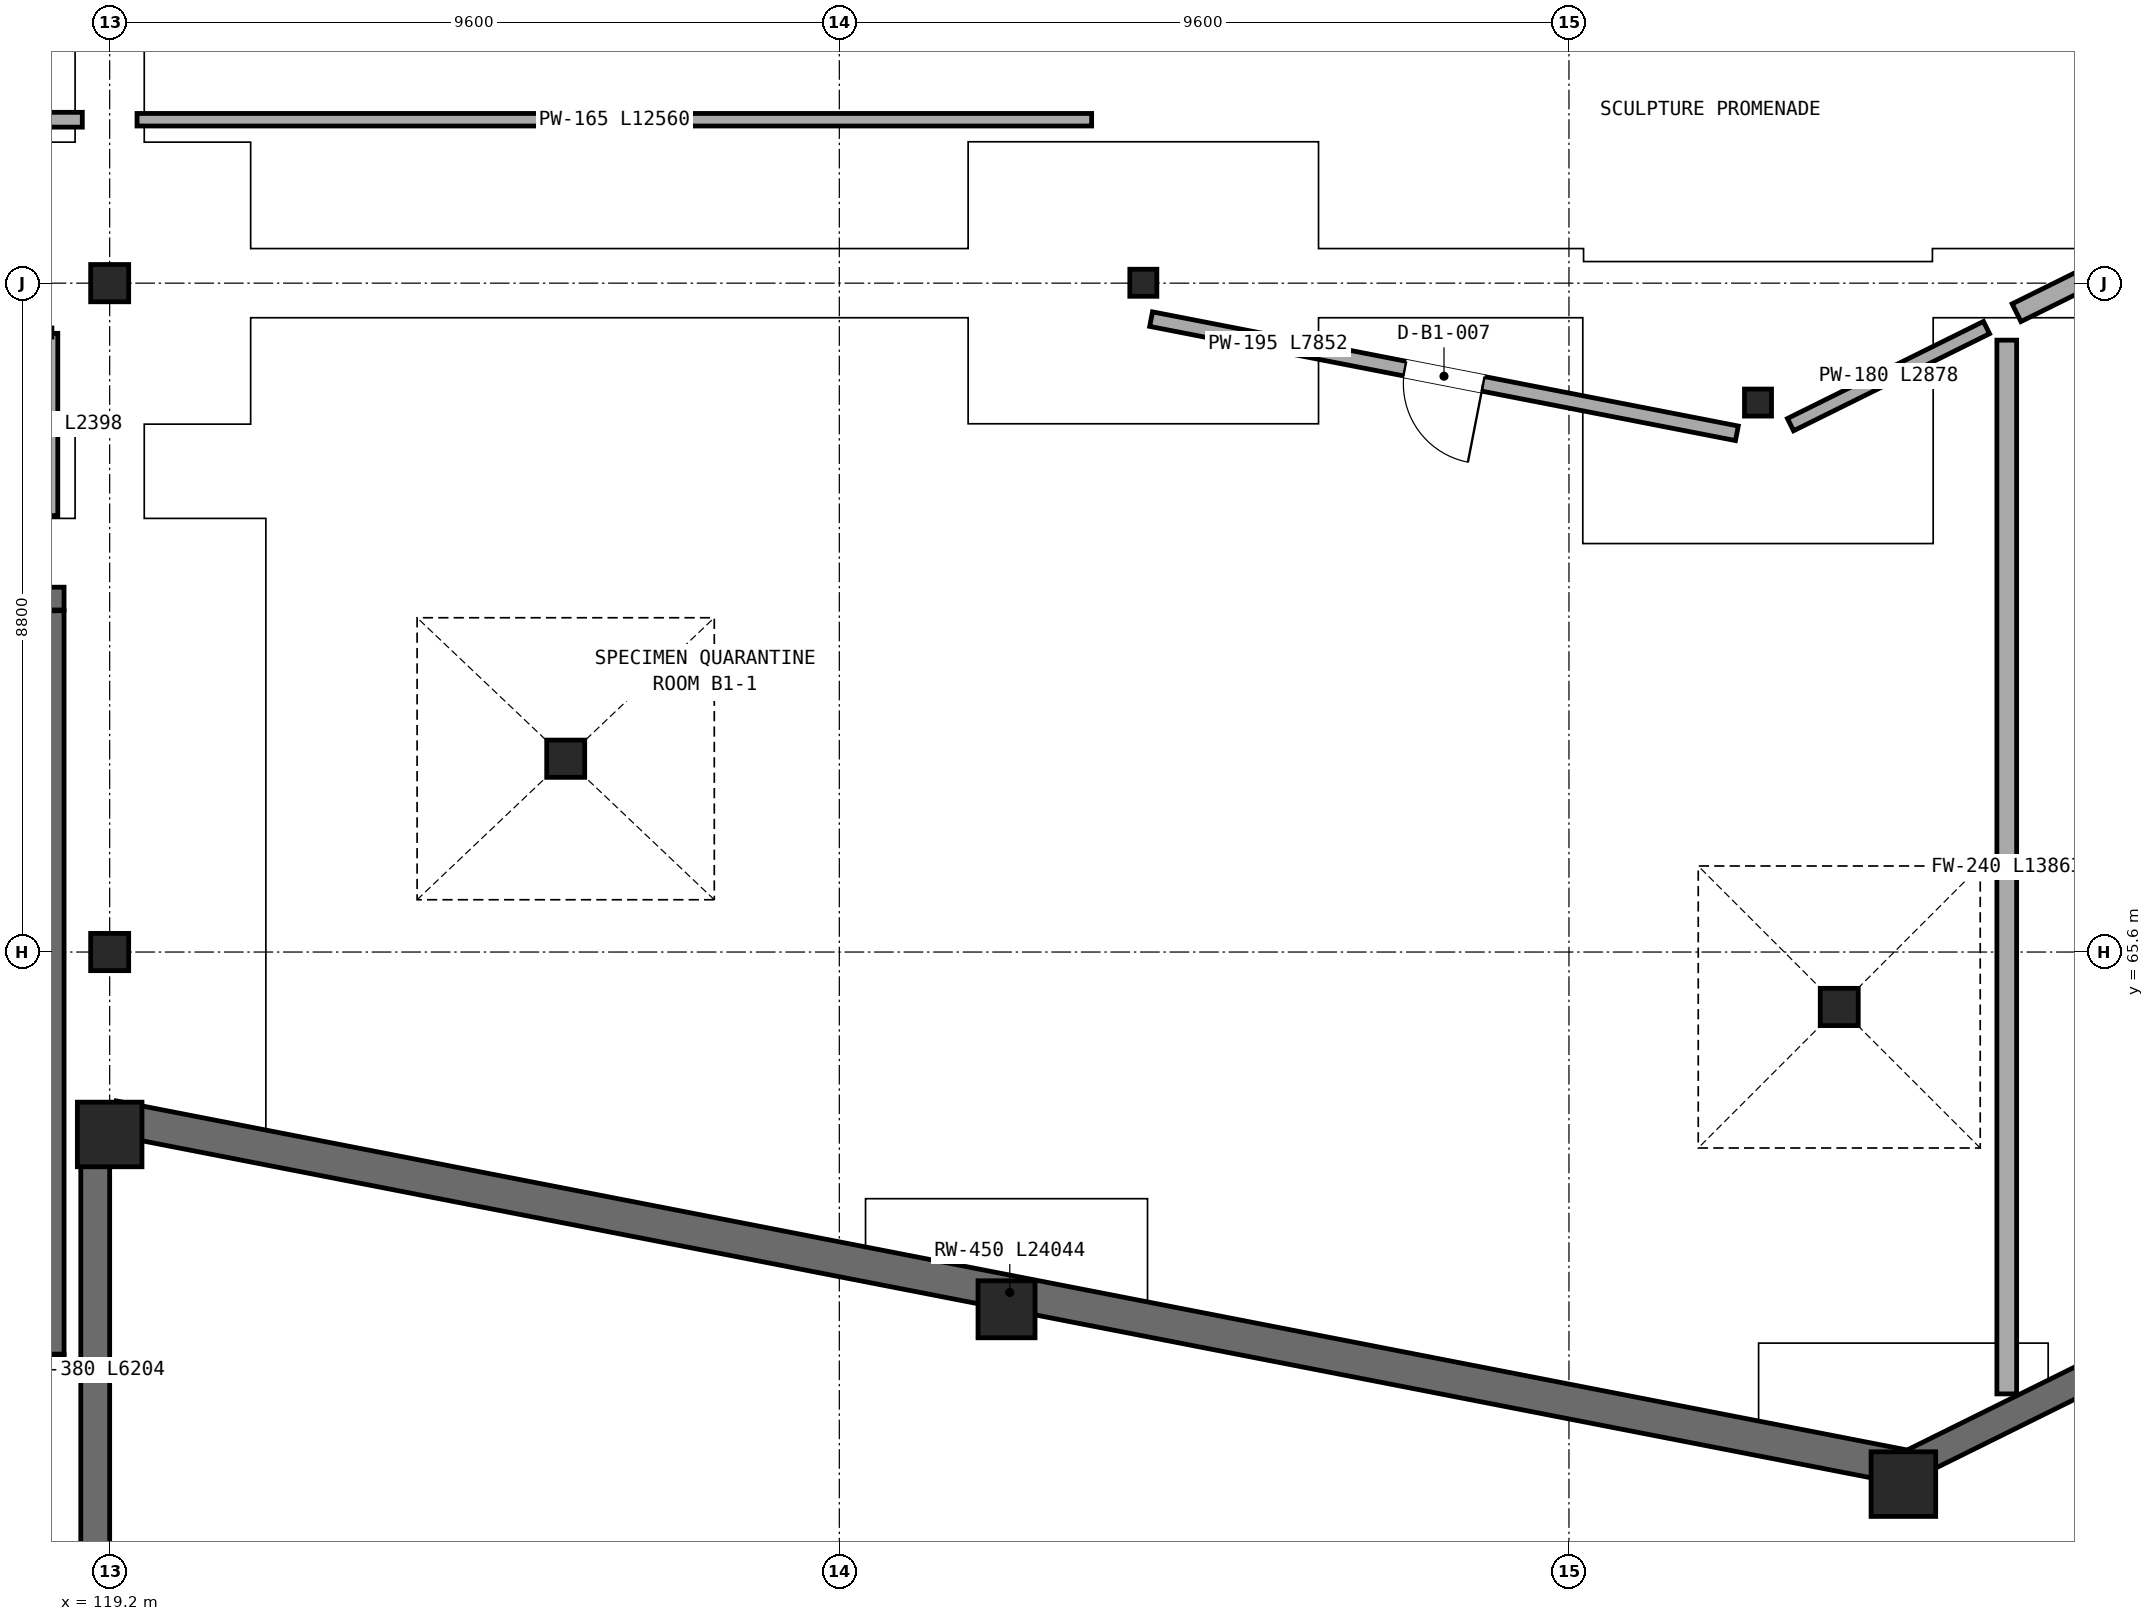
"""IFC4 building model, lengths in metres.
Left out: names, types, materials, properties, quantities, classifications, styles, units other than length and angle.
Written with IfcOpenShell. Run it as: python <this file> out.ifc"""

import sys

from ifc_helpers import new_model, si_unit, direction, frame, frame_2d, origin, origin_2d, place, context, subcontext, project, spatial, rectangle, hollow_circle, i_section, extrude, element, fill, save


model = new_model("IFC4")
c1 = context("Model", 3, precision=1e-05, world=origin(), true_north=direction((0.0, 1.0)))
c2 = subcontext(c1, "Body", "Model", "MODEL_VIEW")
j1 = project(units=[si_unit("LENGTHUNIT", "METRE"), si_unit("PLANEANGLEUNIT", "RADIAN")], contexts=[c1])
p1 = place(None, origin())
s1 = spatial("IfcSite", under=j1, at=p1, CompositionType="ELEMENT")
p2 = place(p1, origin())
s2 = spatial("IfcBuilding", under=s1, at=p2, CompositionType="ELEMENT")
p3 = place(p2, frame((0.0, 0.0, -5.4)))
s3 = spatial("IfcBuildingStorey", under=s2, at=p3, CompositionType="ELEMENT", Elevation=-5.4)
for number, where, z_axis, x_axis in (
    (1, (119.2, 65.6, 0.0), (0.0, 0.0, 1.0), (1.0, 0.0, 0.0)),
    (2, (119.2, 74.4, 0.0), (0.0, 0.0, 1.0), (1.0, 0.0, 0.0)),
):
    element("IfcColumn", number, at=place(p3, frame(where, z_axis=z_axis, x_axis=x_axis)), inside=s3, PredefinedType="COLUMN", context=c2, shape_type="SweptSolid", body=[
        extrude(i_section(OverallWidth=0.5, OverallDepth=0.49, WebThickness=0.028, FlangeThickness=0.04, at=origin_2d()), origin(), (0.0, 0.0, 1.0), 5.4),
    ])
p4 = place(p3, frame((119.2, 63.2, 0.0), z_axis=(0.0, 0.0, 1.0), x_axis=(1.0, 0.0, 0.0)))
e3 = element("IfcColumn", 3, at=p4, inside=s3, PredefinedType="COLUMN", context=c2, shape_type="SweptSolid", body=[
    extrude(rectangle(XDim=0.85, YDim=0.85, at=origin_2d()), origin(), (0.0, 0.0, 1.0), 5.4),
])
p5 = place(p3, frame((131.0, 60.9, 0.0), z_axis=(0.0, 0.0, 1.0), x_axis=(1.0, 0.0, 0.0)))
e4 = element("IfcColumn", 4, at=p5, inside=s3, PredefinedType="COLUMN", context=c2, shape_type="SweptSolid", body=[
    extrude(rectangle(XDim=0.75, YDim=0.75, at=origin_2d()), origin(), (0.0, 0.0, 1.0), 5.4),
])
p6 = place(p3, frame((125.2, 68.143, 0.0), z_axis=(0.0, 0.0, 1.0), x_axis=(1.0, 0.0, 0.0)))
e5 = element("IfcColumn", 5, at=p6, inside=s3, PredefinedType="COLUMN", context=c2, shape_type="SweptSolid", body=[
    extrude(i_section(OverallWidth=0.5, OverallDepth=0.49, WebThickness=0.028, FlangeThickness=0.04, at=origin_2d()), origin(), (0.0, 0.0, 1.0), 5.4),
])
p7 = place(p3, frame((132.8, 74.405, 0.0), z_axis=(0.0, 0.0, 1.0), x_axis=(1.0, 0.0, 0.0)))
e6 = element("IfcColumn", 6, at=p7, inside=s3, PredefinedType="COLUMN", context=c2, shape_type="SweptSolid", body=[
    extrude(hollow_circle(Radius=0.178, WallThickness=0.013, at=origin_2d()), origin(), (0.0, 0.0, 1.0), 5.4),
])
p8 = place(p3, frame((142.8, 58.6, 0.0), z_axis=(0.0, 0.0, 1.0), x_axis=(1.0, 0.0, 0.0)))
e7 = element("IfcColumn", 7, at=p8, inside=s3, PredefinedType="COLUMN", context=c2, shape_type="SweptSolid", body=[
    extrude(rectangle(XDim=0.85, YDim=0.85, at=origin_2d()), origin(), (0.0, 0.0, 1.0), 5.4),
])
p9 = place(p3, frame((141.956, 64.877, 0.0), z_axis=(0.0, 0.0, 1.0), x_axis=(1.0, 0.0, 0.0)))
e8 = element("IfcColumn", 8, at=p9, inside=s3, PredefinedType="COLUMN", context=c2, shape_type="SweptSolid", body=[
    extrude(i_section(OverallWidth=0.5, OverallDepth=0.49, WebThickness=0.028, FlangeThickness=0.04, at=origin_2d()), origin(), (0.0, 0.0, 1.0), 5.4),
])
p10 = place(p3, frame((140.887, 72.829, 0.0), z_axis=(0.0, 0.0, 1.0), x_axis=(1.0, 0.0, 0.0)))
e9 = element("IfcColumn", 9, at=p10, inside=s3, PredefinedType="COLUMN", context=c2, shape_type="SweptSolid", body=[
    extrude(hollow_circle(Radius=0.178, WallThickness=0.013, at=origin_2d()), origin(), (0.0, 0.0, 1.0), 5.4),
])
p11 = place(p3, frame((119.01, 56.996, 0.0), z_axis=(0.0, 0.0, 1.0), x_axis=(0.0, 1.0, 0.0)))
e10 = element("IfcWall", 10, at=p11, inside=s3, PredefinedType="USERDEFINED", context=c2, shape_type="SweptSolid", body=[
    extrude(rectangle(XDim=6.204, YDim=0.38, at=frame_2d((3.102, 0.0))), origin(), (0.0, 0.0, 1.0), 5.06),
])
p12 = place(p3, frame((119.243, 63.421, 0.0), z_axis=(0.0, 0.0, 1.0), x_axis=(0.981528092823, -0.191318067624, 0.0)))
e11 = element("IfcWall", 11, at=p12, inside=s3, PredefinedType="USERDEFINED", context=c2, shape_type="SweptSolid", body=[
    extrude(rectangle(XDim=24.044, YDim=0.45, at=frame_2d((12.022, 0.0))), origin(), (0.0, 0.0, 1.0), 5.06),
])
p13 = place(p3, frame((142.891, 58.857, 0.0), z_axis=(0.0, 0.0, 1.0), x_axis=(0.896160082765, 0.443730893739, 0.0)))
e12 = element("IfcWall", 12, at=p13, inside=s3, PredefinedType="USERDEFINED", context=c2, shape_type="SweptSolid", body=[
    extrude(rectangle(XDim=22.791, YDim=0.38, at=frame_2d((11.396, 0.0))), origin(), (0.0, 0.0, 1.0), 5.06),
])
p14 = place(p3, frame((110.2, 60.15, 0.0), z_axis=(0.0, 0.0, 1.0), x_axis=(1.0, 0.0, 0.0)))
e13 = element("IfcWall", 13, at=p14, inside=s3, PredefinedType="SHEAR", context=c2, shape_type="SweptSolid", body=[
    extrude(rectangle(XDim=8.4, YDim=0.3, at=frame_2d((4.2, 0.0))), origin(), (0.0, 0.0, 1.0), 5.095),
])
p15 = place(p3, frame((118.6, 70.25, 0.0), z_axis=(0.0, 0.0, 1.0), x_axis=(-1.0, 0.0, 0.0)))
e14 = element("IfcWall", 14, at=p15, inside=s3, PredefinedType="SHEAR", context=c2, shape_type="SweptSolid", body=[
    extrude(rectangle(XDim=8.4, YDim=0.3, at=frame_2d((4.2, 0.0))), origin(), (0.0, 0.0, 1.0), 5.095),
])
p16 = place(p15, frame((1.025, 0.0, 0.0)))
e15 = element("IfcOpeningElement", 15, at=p16, cuts=e14, PredefinedType="OPENING", context=c2, shape_type="SweptSolid", body=[
    extrude(rectangle(XDim=1.45, YDim=2.25, at=frame_2d((0.725, 1.125))), frame((0.0, 0.16, 0.0), z_axis=(0.0, -1.0, 0.0), x_axis=(1.0, 0.0, 0.0)), (0.0, 0.0, 1.0), 0.32),
])
p17 = place(p3, frame((118.45, 60.31, 0.0), z_axis=(0.0, 0.0, 1.0), x_axis=(0.0, 1.0, 0.0)))
e16 = element("IfcWall", 16, at=p17, inside=s3, PredefinedType="SHEAR", context=c2, shape_type="SweptSolid", body=[
    extrude(rectangle(XDim=9.78, YDim=0.3, at=frame_2d((4.89, 0.0))), origin(), (0.0, 0.0, 1.0), 5.095),
])
p18 = place(p3, frame((132.902, 73.927, 0.0), z_axis=(0.0, 0.0, 1.0), x_axis=(0.98152920164, -0.191312378918, 0.0)))
e17 = element("IfcWall", 17, at=p18, inside=s3, PredefinedType="PARTITIONING", context=c2, shape_type="SweptSolid", body=[
    extrude(rectangle(XDim=7.852, YDim=0.195, at=frame_2d((3.926, 0.0))), origin(), (0.0, 0.0, 1.0), 5.03),
])
p19 = place(p18, frame((3.401, 0.0, 0.0)))
e18 = element("IfcOpeningElement", 18, at=p19, cuts=e17, PredefinedType="OPENING", context=c2, shape_type="SweptSolid", body=[
    extrude(rectangle(XDim=1.05, YDim=2.15, at=frame_2d((0.525, 1.075))), frame((0.0, 0.107, 0.0), z_axis=(0.0, -1.0, 0.0), x_axis=(1.0, 0.0, 0.0)), (0.0, 0.0, 1.0), 0.215),
])
p20 = place(p3, frame((141.315, 72.538, 0.0), z_axis=(0.0, 0.0, 1.0), x_axis=(0.89618477276, 0.443681026272, 0.0)))
e19 = element("IfcWall", 19, at=p20, inside=s3, PredefinedType="PARTITIONING", context=c2, shape_type="SweptSolid", body=[
    extrude(rectangle(XDim=2.878, YDim=0.18, at=frame_2d((1.439, 0.0))), origin(), (0.0, 0.0, 1.0), 5.03),
])
p21 = place(p3, frame((119.56, 76.55, 0.0), z_axis=(0.0, 0.0, 1.0), x_axis=(1.0, 0.0, 0.0)))
e20 = element("IfcWall", 20, at=p21, inside=s3, PredefinedType="PARTITIONING", context=c2, shape_type="SweptSolid", body=[
    extrude(rectangle(XDim=12.56, YDim=0.165, at=frame_2d((6.28, 0.0))), origin(), (0.0, 0.0, 1.0), 4.36),
])
p22 = place(p3, frame((144.289, 74.011, 0.0), z_axis=(0.0, 0.0, 1.0), x_axis=(0.896175386907, 0.443699984113, 0.0)))
e21 = element("IfcWall", 21, at=p22, inside=s3, PredefinedType="SOLIDWALL", context=c2, shape_type="SweptSolid", body=[
    extrude(rectangle(XDim=8.569, YDim=0.26, at=frame_2d((4.284, 0.0))), origin(), (0.0, 0.0, 1.0), 5.03),
])
p23 = place(p3, frame((118.45, 71.342, 0.0), z_axis=(0.0, 0.0, 1.0), x_axis=(0.0, 1.0, 0.0)))
e22 = element("IfcWall", 22, at=p23, inside=s3, PredefinedType="PARTITIONING", context=c2, shape_type="SweptSolid", body=[
    extrude(rectangle(XDim=2.398, YDim=0.135, at=frame_2d((1.199, 0.0))), origin(), (0.0, 0.0, 1.0), 5.03),
])
p24 = place(p3, frame((109.23, 76.55, 0.0), z_axis=(0.0, 0.0, 1.0), x_axis=(1.0, 0.0, 0.0)))
e23 = element("IfcWall", 23, at=p24, inside=s3, PredefinedType="PARTITIONING", context=c2, shape_type="SweptSolid", body=[
    extrude(rectangle(XDim=9.61, YDim=0.195, at=frame_2d((4.805, 0.0))), origin(), (0.0, 0.0, 1.0), 4.537),
])
p25 = place(p3, frame((144.16, 73.65, 0.0), z_axis=(0.0, 0.0, 1.0), x_axis=(0.0, -1.0, 0.0)))
e24 = element("IfcWall", 24, at=p25, inside=s3, PredefinedType="SOLIDWALL", context=c2, shape_type="SweptSolid", body=[
    extrude(rectangle(XDim=13.863, YDim=0.26, at=frame_2d((6.932, 0.0))), origin(), (0.0, 0.0, 1.0), 4.36),
])
p26 = place(p19, frame((1.05, 0.0, 0.0), z_axis=(0.0, 0.0, 1.0), x_axis=(-1.0, 0.0, 0.0)))
e25 = element("IfcDoor", 25, at=p26, inside=s3, OperationType="SINGLE_SWING_RIGHT", PredefinedType="DOOR", context=c2, shape_type="SweptSolid", body=[
    extrude(rectangle(XDim=1.05, YDim=2.15, at=frame_2d((0.525, 1.075))), frame((0.0, 0.025, 0.0), z_axis=(0.0, -1.0, 0.0), x_axis=(1.0, 0.0, 0.0)), (0.0, 0.0, 1.0), 0.05),
])
fill(e18, e25)
save(model, sys.argv[1])
